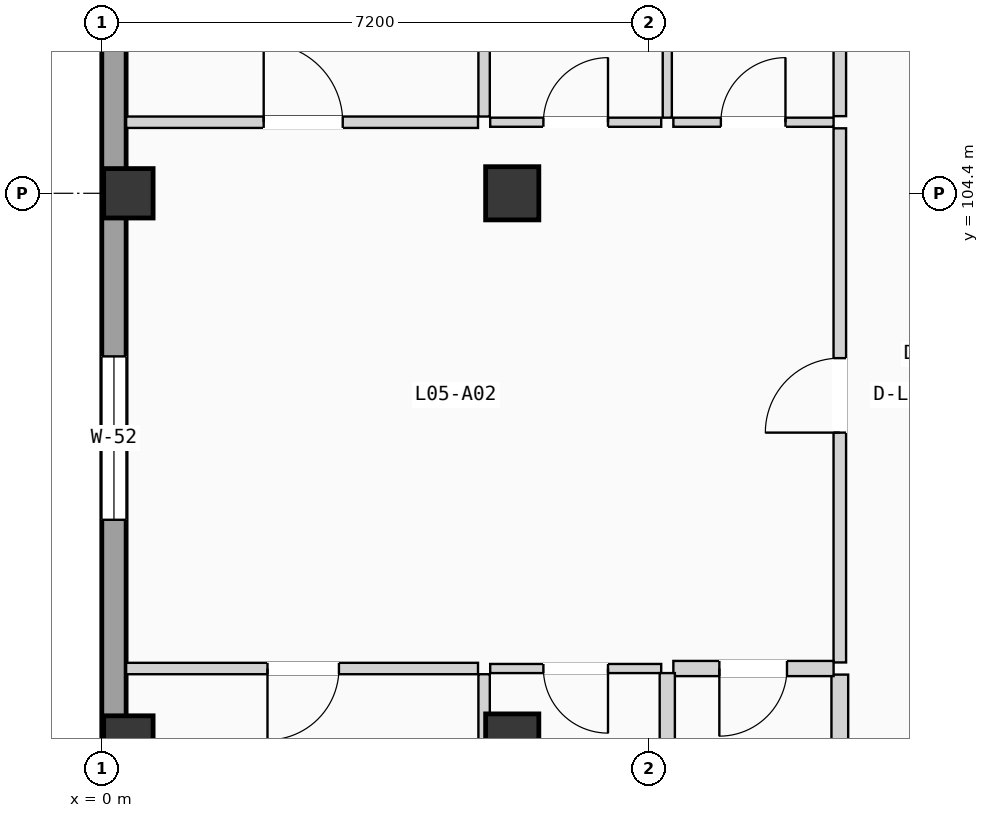
"""IFC4 building model, lengths in metres.
Left out: names, types, materials, properties, quantities, classifications, styles, units other than length and angle.
Written with IfcOpenShell. Run it as: python <this file> out.ifc"""

import sys

from ifc_helpers import new_model, si_unit, direction, frame, frame_2d, origin, origin_2d, place, context, subcontext, project, spatial, rectangle, extrude, element, fill, save


model = new_model("IFC4")
c1 = context("Model", 3, precision=1e-05, world=origin(), true_north=direction((0.0, 1.0)))
c2 = subcontext(c1, "Body", "Model", "MODEL_VIEW")
j1 = project(units=[si_unit("LENGTHUNIT", "METRE"), si_unit("PLANEANGLEUNIT", "RADIAN")], contexts=[c1])
p1 = place(None, origin())
s1 = spatial("IfcSite", under=j1, at=p1, CompositionType="ELEMENT")
p2 = place(p1, origin())
s2 = spatial("IfcBuilding", under=s1, at=p2, CompositionType="ELEMENT")
p3 = place(p2, frame((0.0, 0.0, 18.375)))
s3 = spatial("IfcBuildingStorey", under=s2, at=p3, CompositionType="ELEMENT", Elevation=18.375)
for number, where, z_axis, x_axis in (
    (1, (0.35, 97.2, 0.0), (0.0, 0.0, 1.0), (1.0, 0.0, 0.0)),
    (2, (0.35, 104.4, 0.0), (0.0, 0.0, 1.0), (1.0, 0.0, 0.0)),
):
    element("IfcColumn", number, at=place(p3, frame(where, z_axis=z_axis, x_axis=x_axis)), inside=s3, PredefinedType="COLUMN", context=c2, shape_type="SweptSolid", body=[
        extrude(rectangle(XDim=0.65, YDim=0.65, at=origin_2d()), origin(), (0.0, 0.0, 1.0), 3.15),
    ])
for number, where, z_axis, x_axis in (
    (3, (5.4, 97.2, 0.0), (0.0, 0.0, 1.0), (1.0, 0.0, 0.0)),
    (4, (5.4, 104.4, 0.0), (0.0, 0.0, 1.0), (1.0, 0.0, 0.0)),
):
    element("IfcColumn", number, at=place(p3, frame(where, z_axis=z_axis, x_axis=x_axis)), inside=s3, PredefinedType="COLUMN", context=c2, shape_type="SweptSolid", body=[
        extrude(rectangle(XDim=0.7, YDim=0.7, at=origin_2d()), origin(), (0.0, 0.0, 1.0), 3.15),
    ])
p4 = place(p3, frame((0.16, 68.72, 0.0), z_axis=(0.0, 0.0, 1.0), x_axis=(0.0, 1.0, 0.0)))
e5 = element("IfcWall", 5, at=p4, inside=s3, PredefinedType="SOLIDWALL", context=c2, shape_type="SweptSolid", body=[
    extrude(rectangle(XDim=49.76, YDim=0.32, at=frame_2d((24.88, 0.0))), origin(), (0.0, 0.0, 1.0), 2.89),
])
p5 = place(p4, frame((15.33, 0.0, 0.555)))
e6 = element("IfcOpeningElement", 6, at=p5, cuts=e5, PredefinedType="OPENING", context=c2, shape_type="SweptSolid", body=[
    extrude(rectangle(XDim=2.0, YDim=1.65, at=frame_2d((1.0, 0.825))), frame((0.0, 0.17, 0.0), z_axis=(0.0, -1.0, 0.0), x_axis=(1.0, 0.0, 0.0)), (0.0, 0.0, 1.0), 0.34),
])
p6 = place(p4, frame((9.261, 0.0, 0.85)))
e7 = element("IfcOpeningElement", 7, at=p6, cuts=e5, PredefinedType="OPENING", context=c2, shape_type="SweptSolid", body=[
    extrude(rectangle(XDim=0.95, YDim=1.2, at=frame_2d((0.475, 0.6))), frame((0.0, 0.17, 0.0), z_axis=(0.0, -1.0, 0.0), x_axis=(1.0, 0.0, 0.0)), (0.0, 0.0, 1.0), 0.34),
])
p7 = place(p4, frame((19.265, 0.0, 0.85)))
e8 = element("IfcOpeningElement", 8, at=p7, cuts=e5, PredefinedType="OPENING", context=c2, shape_type="SweptSolid", body=[
    extrude(rectangle(XDim=0.95, YDim=1.2, at=frame_2d((0.475, 0.6))), frame((0.0, 0.17, 0.0), z_axis=(0.0, -1.0, 0.0), x_axis=(1.0, 0.0, 0.0)), (0.0, 0.0, 1.0), 0.34),
])
p8 = place(p4, frame((31.384, 0.0, 0.855)))
e9 = element("IfcOpeningElement", 9, at=p8, cuts=e5, PredefinedType="OPENING", context=c2, shape_type="SweptSolid", body=[
    extrude(rectangle(XDim=2.15, YDim=1.35, at=frame_2d((1.075, 0.675))), frame((0.0, 0.17, 0.0), z_axis=(0.0, -1.0, 0.0), x_axis=(1.0, 0.0, 0.0)), (0.0, 0.0, 1.0), 0.34),
])
p9 = place(p4, frame((24.811, 0.0, 0.705)))
e10 = element("IfcOpeningElement", 10, at=p9, cuts=e5, PredefinedType="OPENING", context=c2, shape_type="SweptSolid", body=[
    extrude(rectangle(XDim=2.15, YDim=1.5, at=frame_2d((1.075, 0.75))), frame((0.0, 0.17, 0.0), z_axis=(0.0, -1.0, 0.0), x_axis=(1.0, 0.0, 0.0)), (0.0, 0.0, 1.0), 0.34),
])
p10 = place(p4, frame((38.513, 0.0, 0.555)))
e11 = element("IfcOpeningElement", 11, at=p10, cuts=e5, PredefinedType="OPENING", context=c2, shape_type="SweptSolid", body=[
    extrude(rectangle(XDim=2.15, YDim=1.65, at=frame_2d((1.075, 0.825))), frame((0.0, 0.17, 0.0), z_axis=(0.0, -1.0, 0.0), x_axis=(1.0, 0.0, 0.0)), (0.0, 0.0, 1.0), 0.34),
])
p11 = place(p3, frame((9.71, 98.227, 0.0), z_axis=(0.0, 0.0, 1.0), x_axis=(0.0, 1.0, 0.0)))
e12 = element("IfcWall", 12, at=p11, inside=s3, PredefinedType="PARTITIONING", context=c2, shape_type="SweptSolid", body=[
    extrude(rectangle(XDim=7.028, YDim=0.165, at=frame_2d((3.514, 0.0))), origin(), (0.0, 0.0, 1.0), 2.87),
])
p12 = place(p11, frame((3.024, 0.0, 0.0)))
e13 = element("IfcOpeningElement", 13, at=p12, cuts=e12, PredefinedType="OPENING", context=c2, shape_type="SweptSolid", body=[
    extrude(rectangle(XDim=0.98, YDim=2.08, at=frame_2d((0.49, 1.04))), frame((0.0, 0.093, 0.0), z_axis=(0.0, -1.0, 0.0), x_axis=(1.0, 0.0, 0.0)), (0.0, 0.0, 1.0), 0.185),
])
p13 = place(p3, frame((9.71, 92.282, 0.0), z_axis=(0.0, 0.0, 1.0), x_axis=(0.0, 1.0, 0.0)))
e14 = element("IfcWall", 14, at=p13, inside=s3, PredefinedType="PLUMBINGWALL", context=c2, shape_type="SweptSolid", body=[
    extrude(rectangle(XDim=5.785, YDim=0.22, at=frame_2d((2.893, 0.0))), origin(), (0.0, 0.0, 1.0), 2.87),
])
p14 = place(p3, frame((9.71, 105.415, 0.0), z_axis=(0.0, 0.0, 1.0), x_axis=(0.0, 1.0, 0.0)))
e15 = element("IfcWall", 15, at=p14, inside=s3, PredefinedType="PARTITIONING", context=c2, shape_type="SweptSolid", body=[
    extrude(rectangle(XDim=5.785, YDim=0.165, at=frame_2d((2.893, 0.0))), origin(), (0.0, 0.0, 1.0), 2.87),
])
p15 = place(p3, frame((7.52, 98.147, 0.0), z_axis=(0.0, 0.0, 1.0), x_axis=(1.0, 0.0, 0.0)))
e16 = element("IfcWall", 16, at=p15, inside=s3, PredefinedType="PLUMBINGWALL", context=c2, shape_type="SweptSolid", body=[
    extrude(rectangle(XDim=2.108, YDim=0.2, at=frame_2d((1.054, 0.0))), origin(), (0.0, 0.0, 1.0), 2.87),
])
p16 = place(p15, frame((0.605, 0.0, 0.0)))
e17 = element("IfcOpeningElement", 17, at=p16, cuts=e16, PredefinedType="OPENING", context=c2, shape_type="SweptSolid", body=[
    extrude(rectangle(XDim=0.89, YDim=2.03, at=frame_2d((0.445, 1.015))), frame((0.0, 0.11, 0.0), z_axis=(0.0, -1.0, 0.0), x_axis=(1.0, 0.0, 0.0)), (0.0, 0.0, 1.0), 0.22),
])
p17 = place(p3, frame((7.52, 105.335, 0.0), z_axis=(0.0, 0.0, 1.0), x_axis=(1.0, 0.0, 0.0)))
e18 = element("IfcWall", 18, at=p17, inside=s3, PredefinedType="PARTITIONING", context=c2, shape_type="SweptSolid", body=[
    extrude(rectangle(XDim=2.108, YDim=0.12, at=frame_2d((1.054, 0.0))), origin(), (0.0, 0.0, 1.0), 2.87),
])
p18 = place(p17, frame((0.625, 0.0, 0.0)))
e19 = element("IfcOpeningElement", 19, at=p18, cuts=e18, PredefinedType="OPENING", context=c2, shape_type="SweptSolid", body=[
    extrude(rectangle(XDim=0.85, YDim=2.01, at=frame_2d((0.425, 1.005))), frame((0.0, 0.07, 0.0), z_axis=(0.0, -1.0, 0.0), x_axis=(1.0, 0.0, 0.0)), (0.0, 0.0, 1.0), 0.14),
])
p19 = place(p3, frame((0.32, 98.147, 0.0), z_axis=(0.0, 0.0, 1.0), x_axis=(1.0, 0.0, 0.0)))
e20 = element("IfcWall", 20, at=p19, inside=s3, PredefinedType="PARTITIONING", context=c2, shape_type="SweptSolid", body=[
    extrude(rectangle(XDim=4.63, YDim=0.15, at=frame_2d((2.315, 0.0))), origin(), (0.0, 0.0, 1.0), 2.87),
])
p20 = place(p19, frame((1.86, 0.0, 0.0)))
e21 = element("IfcOpeningElement", 21, at=p20, cuts=e20, PredefinedType="OPENING", context=c2, shape_type="SweptSolid", body=[
    extrude(rectangle(XDim=0.94, YDim=2.06, at=frame_2d((0.47, 1.03))), frame((0.0, 0.085, 0.0), z_axis=(0.0, -1.0, 0.0), x_axis=(1.0, 0.0, 0.0)), (0.0, 0.0, 1.0), 0.17),
])
p21 = place(p3, frame((5.11, 98.147, 0.0), z_axis=(0.0, 0.0, 1.0), x_axis=(1.0, 0.0, 0.0)))
e22 = element("IfcWall", 22, at=p21, inside=s3, PredefinedType="PARTITIONING", context=c2, shape_type="SweptSolid", body=[
    extrude(rectangle(XDim=2.25, YDim=0.12, at=frame_2d((1.125, 0.0))), origin(), (0.0, 0.0, 1.0), 2.87),
])
p22 = place(p21, frame((0.7, 0.0, 0.0)))
e23 = element("IfcOpeningElement", 23, at=p22, cuts=e22, PredefinedType="OPENING", context=c2, shape_type="SweptSolid", body=[
    extrude(rectangle(XDim=0.85, YDim=2.01, at=frame_2d((0.425, 1.005))), frame((0.0, 0.07, 0.0), z_axis=(0.0, -1.0, 0.0), x_axis=(1.0, 0.0, 0.0)), (0.0, 0.0, 1.0), 0.14),
])
p23 = place(p3, frame((0.32, 105.335, 0.0), z_axis=(0.0, 0.0, 1.0), x_axis=(1.0, 0.0, 0.0)))
e24 = element("IfcWall", 24, at=p23, inside=s3, PredefinedType="PARTITIONING", context=c2, shape_type="SweptSolid", body=[
    extrude(rectangle(XDim=4.63, YDim=0.15, at=frame_2d((2.315, 0.0))), origin(), (0.0, 0.0, 1.0), 2.87),
])
p24 = place(p23, frame((1.81, 0.0, 0.0)))
e25 = element("IfcOpeningElement", 25, at=p24, cuts=e24, PredefinedType="OPENING", context=c2, shape_type="SweptSolid", body=[
    extrude(rectangle(XDim=1.04, YDim=2.08, at=frame_2d((0.52, 1.04))), frame((0.0, 0.085, 0.0), z_axis=(0.0, -1.0, 0.0), x_axis=(1.0, 0.0, 0.0)), (0.0, 0.0, 1.0), 0.17),
])
p25 = place(p3, frame((5.11, 105.335, 0.0), z_axis=(0.0, 0.0, 1.0), x_axis=(1.0, 0.0, 0.0)))
e26 = element("IfcWall", 26, at=p25, inside=s3, PredefinedType="PARTITIONING", context=c2, shape_type="SweptSolid", body=[
    extrude(rectangle(XDim=2.25, YDim=0.12, at=frame_2d((1.125, 0.0))), origin(), (0.0, 0.0, 1.0), 2.87),
])
p26 = place(p25, frame((0.7, 0.0, 0.0)))
e27 = element("IfcOpeningElement", 27, at=p26, cuts=e26, PredefinedType="OPENING", context=c2, shape_type="SweptSolid", body=[
    extrude(rectangle(XDim=0.85, YDim=2.01, at=frame_2d((0.425, 1.005))), frame((0.0, 0.07, 0.0), z_axis=(0.0, -1.0, 0.0), x_axis=(1.0, 0.0, 0.0)), (0.0, 0.0, 1.0), 0.14),
])
p27 = place(p3, frame((7.44, 92.282, 0.0), z_axis=(0.0, 0.0, 1.0), x_axis=(0.0, 1.0, 0.0)))
e28 = element("IfcWall", 28, at=p27, inside=s3, PredefinedType="PLUMBINGWALL", context=c2, shape_type="SweptSolid", body=[
    extrude(rectangle(XDim=5.805, YDim=0.2, at=frame_2d((2.902, 0.0))), origin(), (0.0, 0.0, 1.0), 2.87),
])
p28 = place(p27, frame((2.467, 0.0, 0.0)))
e29 = element("IfcOpeningElement", 29, at=p28, cuts=e28, PredefinedType="OPENING", context=c2, shape_type="SweptSolid", body=[
    extrude(rectangle(XDim=0.85, YDim=2.01, at=frame_2d((0.425, 1.005))), frame((0.0, 0.11, 0.0), z_axis=(0.0, -1.0, 0.0), x_axis=(1.0, 0.0, 0.0)), (0.0, 0.0, 1.0), 0.22),
])
p29 = place(p3, frame((7.44, 105.395, 0.0), z_axis=(0.0, 0.0, 1.0), x_axis=(0.0, 1.0, 0.0)))
e30 = element("IfcWall", 30, at=p29, inside=s3, PredefinedType="PARTITIONING", context=c2, shape_type="SweptSolid", body=[
    extrude(rectangle(XDim=5.805, YDim=0.12, at=frame_2d((2.902, 0.0))), origin(), (0.0, 0.0, 1.0), 2.87),
])
for number, where, z_axis, x_axis in (
    (31, (5.03, 92.282, 0.0), (0.0, 0.0, 1.0), (0.0, 1.0, 0.0)),
    (32, (5.03, 105.41, 0.0), (0.0, 0.0, 1.0), (0.0, 1.0, 0.0)),
):
    element("IfcWall", number, at=place(p3, frame(where, z_axis=z_axis, x_axis=x_axis)), inside=s3, PredefinedType="PARTITIONING", context=c2, shape_type="SweptSolid", body=[
        extrude(rectangle(XDim=5.79, YDim=0.15, at=frame_2d((2.895, 0.0))), origin(), (0.0, 0.0, 1.0), 2.87),
    ])
p30 = place(p8, origin())
e33 = element("IfcWindow", 33, at=p30, inside=s3, PartitioningType="DOUBLE_PANEL_VERTICAL", PredefinedType="WINDOW", context=c2, shape_type="SweptSolid", body=[
    extrude(rectangle(XDim=2.15, YDim=1.35, at=frame_2d((1.075, 0.675))), frame((0.0, 0.03, 0.0), z_axis=(0.0, -1.0, 0.0), x_axis=(1.0, 0.0, 0.0)), (0.0, 0.0, 1.0), 0.06),
])
fill(e9, e33)
p31 = place(p12, origin())
e34 = element("IfcDoor", 34, at=p31, inside=s3, OperationType="SINGLE_SWING_LEFT", PredefinedType="DOOR", context=c2, shape_type="SweptSolid", body=[
    extrude(rectangle(XDim=0.98, YDim=2.08, at=frame_2d((0.49, 1.04))), frame((0.0, 0.025, 0.0), z_axis=(0.0, -1.0, 0.0), x_axis=(1.0, 0.0, 0.0)), (0.0, 0.0, 1.0), 0.05),
])
fill(e13, e34)
p32 = place(p16, frame((0.89, 0.0, 0.0), z_axis=(0.0, 0.0, 1.0), x_axis=(-1.0, 0.0, 0.0)))
e35 = element("IfcDoor", 35, at=p32, inside=s3, OperationType="SINGLE_SWING_LEFT", PredefinedType="DOOR", context=c2, shape_type="SweptSolid", body=[
    extrude(rectangle(XDim=0.89, YDim=2.03, at=frame_2d((0.445, 1.015))), frame((0.0, 0.025, 0.0), z_axis=(0.0, -1.0, 0.0), x_axis=(1.0, 0.0, 0.0)), (0.0, 0.0, 1.0), 0.05),
])
fill(e17, e35)
p33 = place(p18, origin())
e36 = element("IfcDoor", 36, at=p33, inside=s3, OperationType="SINGLE_SWING_RIGHT", PredefinedType="DOOR", context=c2, shape_type="SweptSolid", body=[
    extrude(rectangle(XDim=0.85, YDim=2.01, at=frame_2d((0.425, 1.005))), frame((0.0, 0.025, 0.0), z_axis=(0.0, -1.0, 0.0), x_axis=(1.0, 0.0, 0.0)), (0.0, 0.0, 1.0), 0.05),
])
fill(e19, e36)
p34 = place(p20, frame((0.94, 0.0, 0.0), z_axis=(0.0, 0.0, 1.0), x_axis=(-1.0, 0.0, 0.0)))
e37 = element("IfcDoor", 37, at=p34, inside=s3, OperationType="SINGLE_SWING_LEFT", PredefinedType="DOOR", context=c2, shape_type="SweptSolid", body=[
    extrude(rectangle(XDim=0.94, YDim=2.06, at=frame_2d((0.47, 1.03))), frame((0.0, 0.025, 0.0), z_axis=(0.0, -1.0, 0.0), x_axis=(1.0, 0.0, 0.0)), (0.0, 0.0, 1.0), 0.05),
])
fill(e21, e37)
p35 = place(p22, frame((0.85, 0.0, 0.0), z_axis=(0.0, 0.0, 1.0), x_axis=(-1.0, 0.0, 0.0)))
e38 = element("IfcDoor", 38, at=p35, inside=s3, OperationType="SINGLE_SWING_RIGHT", PredefinedType="DOOR", context=c2, shape_type="SweptSolid", body=[
    extrude(rectangle(XDim=0.85, YDim=2.01, at=frame_2d((0.425, 1.005))), frame((0.0, 0.025, 0.0), z_axis=(0.0, -1.0, 0.0), x_axis=(1.0, 0.0, 0.0)), (0.0, 0.0, 1.0), 0.05),
])
fill(e23, e38)
p36 = place(p24, origin())
e39 = element("IfcDoor", 39, at=p36, inside=s3, OperationType="SINGLE_SWING_LEFT", PredefinedType="DOOR", context=c2, shape_type="SweptSolid", body=[
    extrude(rectangle(XDim=1.04, YDim=2.08, at=frame_2d((0.52, 1.04))), frame((0.0, 0.025, 0.0), z_axis=(0.0, -1.0, 0.0), x_axis=(1.0, 0.0, 0.0)), (0.0, 0.0, 1.0), 0.05),
])
fill(e25, e39)
p37 = place(p26, origin())
e40 = element("IfcDoor", 40, at=p37, inside=s3, OperationType="SINGLE_SWING_RIGHT", PredefinedType="DOOR", context=c2, shape_type="SweptSolid", body=[
    extrude(rectangle(XDim=0.85, YDim=2.01, at=frame_2d((0.425, 1.005))), frame((0.0, 0.025, 0.0), z_axis=(0.0, -1.0, 0.0), x_axis=(1.0, 0.0, 0.0)), (0.0, 0.0, 1.0), 0.05),
])
fill(e27, e40)
save(model, sys.argv[1])
